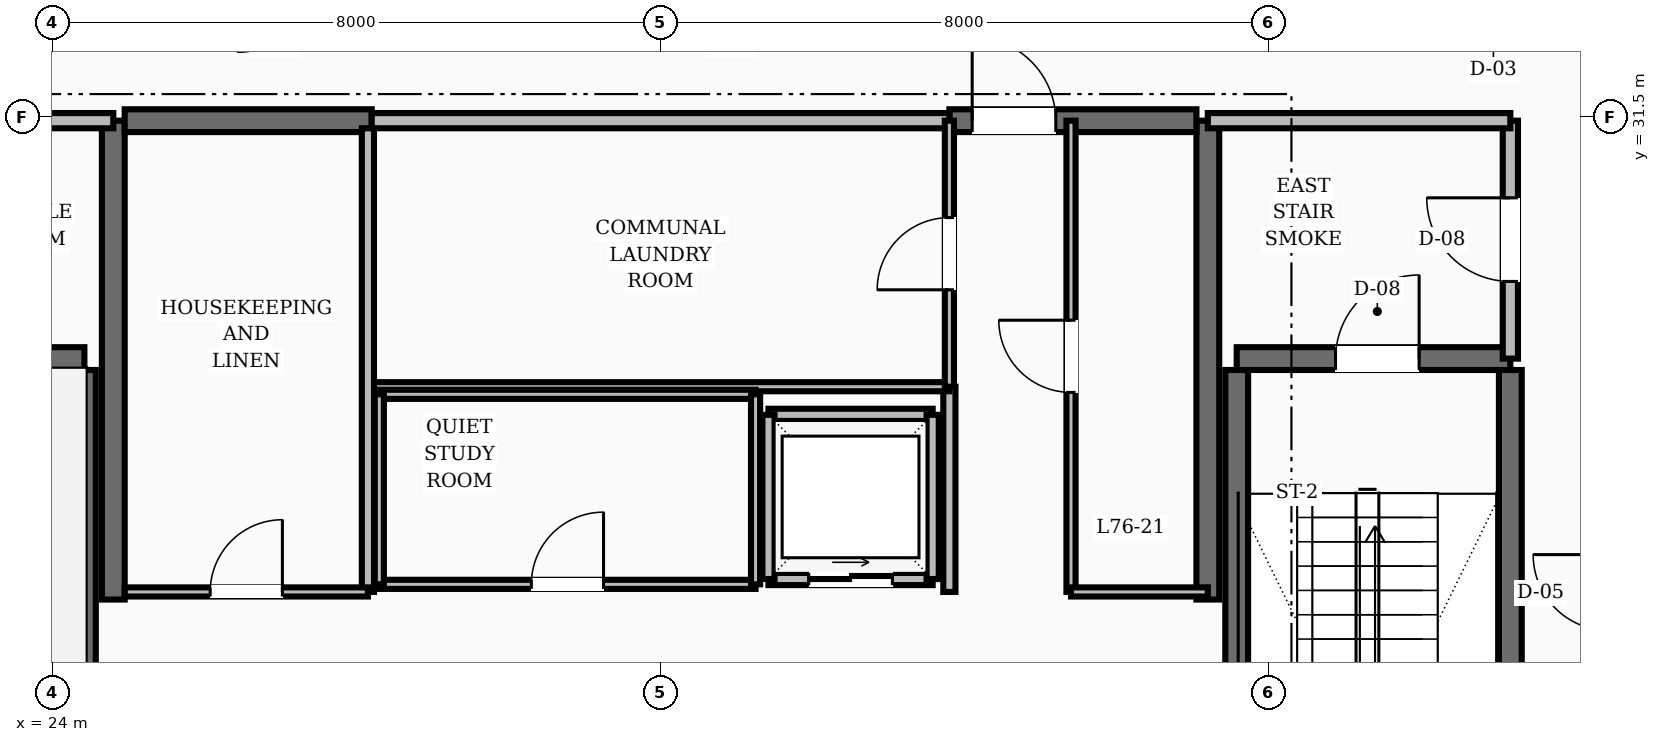
"""IFC4 building model, lengths in metres.
Left out: names, types, materials, properties, quantities, classifications, styles, units other than length and angle.
Written with IfcOpenShell. Run it as: python <this file> out.ifc"""

import sys

from ifc_helpers import new_model, si_unit, direction, frame, frame_2d, origin, place, context, subcontext, project, spatial, rectangle, extrude, element, fill, save


model = new_model("IFC4")
c1 = context("Model", 3, precision=1e-05, world=origin(), true_north=direction((0.0, 1.0)))
c2 = subcontext(c1, "Body", "Model", "MODEL_VIEW")
j1 = project(units=[si_unit("LENGTHUNIT", "METRE"), si_unit("PLANEANGLEUNIT", "RADIAN")], contexts=[c1])
p1 = place(None, origin())
s1 = spatial("IfcSite", under=j1, at=p1, CompositionType="ELEMENT")
p2 = place(p1, origin())
s2 = spatial("IfcBuilding", under=s1, at=p2, CompositionType="ELEMENT")
p3 = place(p2, frame((0.0, 0.0, 290.4)))
s3 = spatial("IfcBuildingStorey", under=s2, at=p3, CompositionType="ELEMENT", Elevation=290.4)
for number, where, z_axis, x_axis in (
    (1, (24.8, 25.15, 0.0), (0.0, 0.0, 1.0), (0.0, 1.0, 0.0)),
    (2, (39.2, 25.15, 0.0), (0.0, 0.0, 1.0), (0.0, 1.0, 0.0)),
):
    element("IfcWall", number, at=place(p3, frame(where, z_axis=z_axis, x_axis=x_axis)), inside=s3, PredefinedType="SHEAR", context=c2, shape_type="SweptSolid", body=[
        extrude(rectangle(XDim=6.3, YDim=0.3, at=frame_2d((3.15, 0.0))), origin(), (0.0, 0.0, 1.0), 3.6),
    ])
p4 = place(p3, frame((24.95, 31.45, 0.0), z_axis=(0.0, 0.0, 1.0), x_axis=(1.0, 0.0, 0.0)))
e3 = element("IfcWall", 3, at=p4, inside=s3, PredefinedType="SHEAR", context=c2, shape_type="SweptSolid", body=[
    extrude(rectangle(XDim=3.25, YDim=0.3, at=frame_2d((1.625, 0.0))), origin(), (0.0, 0.0, 1.0), 3.6),
])
p5 = place(p3, frame((35.8, 31.45, 0.0), z_axis=(0.0, 0.0, 1.0), x_axis=(1.0, 0.0, 0.0)))
e4 = element("IfcWall", 4, at=p5, inside=s3, PredefinedType="SHEAR", context=c2, shape_type="SweptSolid", body=[
    extrude(rectangle(XDim=3.25, YDim=0.3, at=frame_2d((1.625, 0.0))), origin(), (0.0, 0.0, 1.0), 3.6),
])
p6 = place(p5, frame((0.3, 0.0, 0.0)))
e5 = element("IfcOpeningElement", 5, at=p6, cuts=e4, PredefinedType="OPENING", context=c2, shape_type="SweptSolid", body=[
    extrude(rectangle(XDim=1.1, YDim=2.1, at=frame_2d((0.55, 1.05))), frame((0.0, 0.16, 0.0), z_axis=(0.0, -1.0, 0.0), x_axis=(1.0, 0.0, 0.0)), (0.0, 0.0, 1.0), 0.32),
])
p7 = place(p3, frame((24.42, 19.43, 0.0), z_axis=(0.0, 0.0, 1.0), x_axis=(0.0, 1.0, 0.0)))
e6 = element("IfcWall", 6, at=p7, inside=s3, PredefinedType="SHEAR", context=c2, shape_type="SweptSolid", body=[
    extrude(rectangle(XDim=8.74, YDim=0.3, at=frame_2d((4.37, 0.0))), origin(), (0.0, 0.0, 1.0), 3.6),
])
p8 = place(p3, frame((20.82, 28.32, 0.0), z_axis=(0.0, 0.0, 1.0), x_axis=(1.0, 0.0, 0.0)))
e7 = element("IfcWall", 7, at=p8, inside=s3, PredefinedType="SHEAR", context=c2, shape_type="SweptSolid", body=[
    extrude(rectangle(XDim=3.6, YDim=0.3, at=frame_2d((1.8, 0.0))), origin(), (0.0, 0.0, 1.0), 3.6),
])
for number, where, z_axis, x_axis in (
    (8, (43.18, 19.43, 0.0), (0.0, 0.0, 1.0), (0.0, 1.0, 0.0)),
    (9, (39.58, 19.43, 0.0), (0.0, 0.0, 1.0), (0.0, 1.0, 0.0)),
):
    element("IfcWall", number, at=place(p3, frame(where, z_axis=z_axis, x_axis=x_axis)), inside=s3, PredefinedType="SHEAR", context=c2, shape_type="SweptSolid", body=[
        extrude(rectangle(XDim=8.74, YDim=0.3, at=frame_2d((4.37, 0.0))), origin(), (0.0, 0.0, 1.0), 3.6),
    ])
p9 = place(p3, frame((39.58, 28.32, 0.0), z_axis=(0.0, 0.0, 1.0), x_axis=(1.0, 0.0, 0.0)))
e10 = element("IfcWall", 10, at=p9, inside=s3, PredefinedType="SHEAR", context=c2, shape_type="SweptSolid", body=[
    extrude(rectangle(XDim=3.6, YDim=0.3, at=frame_2d((1.8, 0.0))), origin(), (0.0, 0.0, 1.0), 3.6),
])
p10 = place(p9, frame((1.3, 0.0, 0.0)))
e11 = element("IfcOpeningElement", 11, at=p10, cuts=e10, PredefinedType="OPENING", context=c2, shape_type="SweptSolid", body=[
    extrude(rectangle(XDim=1.1, YDim=2.1, at=frame_2d((0.55, 1.05))), frame((0.0, 0.16, 0.0), z_axis=(0.0, -1.0, 0.0), x_axis=(1.0, 0.0, 0.0)), (0.0, 0.0, 1.0), 0.32),
])
p11 = place(p3, frame((43.18, 28.32, 0.0), z_axis=(0.0, 0.0, 1.0), x_axis=(0.0, 1.0, 0.0)))
e12 = element("IfcWall", 12, at=p11, inside=s3, PredefinedType="SOLIDWALL", context=c2, shape_type="SweptSolid", body=[
    extrude(rectangle(XDim=3.13, YDim=0.2, at=frame_2d((1.565, 0.0))), origin(), (0.0, 0.0, 1.0), 2.87),
])
p12 = place(p11, frame((1.015, 0.0, 0.0)))
e13 = element("IfcOpeningElement", 13, at=p12, cuts=e12, PredefinedType="OPENING", context=c2, shape_type="SweptSolid", body=[
    extrude(rectangle(XDim=1.1, YDim=2.1, at=frame_2d((0.55, 1.05))), frame((0.0, 0.11, 0.0), z_axis=(0.0, -1.0, 0.0), x_axis=(1.0, 0.0, 0.0)), (0.0, 0.0, 1.0), 0.22),
])
for number, where, z_axis, x_axis in (
    (14, (39.2, 31.45, 0.0), (0.0, 0.0, 1.0), (1.0, 0.0, 0.0)),
    (15, (20.82, 31.45, 0.0), (0.0, 0.0, 1.0), (1.0, 0.0, 0.0)),
):
    element("IfcWall", number, at=place(p3, frame(where, z_axis=z_axis, x_axis=x_axis)), inside=s3, PredefinedType="SOLIDWALL", context=c2, shape_type="SweptSolid", body=[
        extrude(rectangle(XDim=3.98, YDim=0.2, at=frame_2d((1.99, 0.0))), origin(), (0.0, 0.0, 1.0), 2.87),
    ])
p13 = place(p3, frame((35.8, 25.25, 0.0), z_axis=(0.0, 0.0, 1.0), x_axis=(0.0, 1.0, 0.0)))
e16 = element("IfcWall", 16, at=p13, inside=s3, PredefinedType="SOLIDWALL", context=c2, shape_type="SweptSolid", body=[
    extrude(rectangle(XDim=2.7, YDim=0.16, at=frame_2d((1.35, 0.0))), origin(), (0.0, 0.0, 1.0), 2.87),
])
p14 = place(p3, frame((33.42, 25.42, 0.0), z_axis=(0.0, 0.0, 1.0), x_axis=(1.0, 0.0, 0.0)))
e17 = element("IfcWall", 17, at=p14, inside=s3, PredefinedType="SOLIDWALL", context=c2, shape_type="SweptSolid", body=[
    extrude(rectangle(XDim=2.16, YDim=0.16, at=frame_2d((1.08, 0.0))), origin(), (0.0, 0.0, 1.0), 2.87),
])
p15 = place(p14, frame((0.53, 0.0, 0.0)))
e18 = element("IfcOpeningElement", 18, at=p15, cuts=e17, PredefinedType="OPENING", context=c2, shape_type="SweptSolid", body=[
    extrude(rectangle(XDim=1.1, YDim=2.15, at=frame_2d((0.55, 1.075))), frame((0.0, 0.09, 0.0), z_axis=(0.0, -1.0, 0.0), x_axis=(1.0, 0.0, 0.0)), (0.0, 0.0, 1.0), 0.18),
])
for number, where, z_axis, x_axis in (
    (19, (33.42, 27.58, 0.0), (0.0, 0.0, 1.0), (1.0, 0.0, 0.0)),
    (20, (33.42, 25.42, 0.0), (0.0, 0.0, 1.0), (0.0, 1.0, 0.0)),
    (21, (35.58, 25.42, 0.0), (0.0, 0.0, 1.0), (0.0, 1.0, 0.0)),
):
    element("IfcWall", number, at=place(p3, frame(where, z_axis=z_axis, x_axis=x_axis)), inside=s3, PredefinedType="SOLIDWALL", context=c2, shape_type="SweptSolid", body=[
        extrude(rectangle(XDim=2.16, YDim=0.16, at=frame_2d((1.08, 0.0))), origin(), (0.0, 0.0, 1.0), 2.87),
    ])
p16 = place(p3, frame((28.2, 31.45, 0.0), z_axis=(0.0, 0.0, 1.0), x_axis=(1.0, 0.0, 0.0)))
e22 = element("IfcWall", 22, at=p16, inside=s3, PredefinedType="SOLIDWALL", context=c2, shape_type="SweptSolid", body=[
    extrude(rectangle(XDim=7.6, YDim=0.2, at=frame_2d((3.8, 0.0))), origin(), (0.0, 0.0, 1.0), 2.87),
])
p17 = place(p3, frame((28.2, 27.95, 0.0), z_axis=(0.0, 0.0, 1.0), x_axis=(1.0, 0.0, 0.0)))
e23 = element("IfcWall", 23, at=p17, inside=s3, PredefinedType="PARTITIONING", context=c2, shape_type="SweptSolid", body=[
    extrude(rectangle(XDim=7.6, YDim=0.12, at=frame_2d((3.8, 0.0))), origin(), (0.0, 0.0, 1.0), 2.87),
])
p18 = place(p3, frame((35.8, 27.95, 0.0), z_axis=(0.0, 0.0, 1.0), x_axis=(0.0, 1.0, 0.0)))
e24 = element("IfcWall", 24, at=p18, inside=s3, PredefinedType="PARTITIONING", context=c2, shape_type="SweptSolid", body=[
    extrude(rectangle(XDim=3.5, YDim=0.12, at=frame_2d((1.75, 0.0))), origin(), (0.0, 0.0, 1.0), 2.87),
])
p19 = place(p18, frame((1.275, 0.0, 0.0)))
e25 = element("IfcOpeningElement", 25, at=p19, cuts=e24, PredefinedType="OPENING", context=c2, shape_type="SweptSolid", body=[
    extrude(rectangle(XDim=0.95, YDim=2.1, at=frame_2d((0.475, 1.05))), frame((0.0, 0.07, 0.0), z_axis=(0.0, -1.0, 0.0), x_axis=(1.0, 0.0, 0.0)), (0.0, 0.0, 1.0), 0.14),
])
p20 = place(p3, frame((28.3, 25.35, 0.0), z_axis=(0.0, 0.0, 1.0), x_axis=(1.0, 0.0, 0.0)))
e26 = element("IfcWall", 26, at=p20, inside=s3, PredefinedType="PARTITIONING", context=c2, shape_type="SweptSolid", body=[
    extrude(rectangle(XDim=4.95, YDim=0.12, at=frame_2d((2.475, 0.0))), origin(), (0.0, 0.0, 1.0), 2.87),
])
p21 = place(p20, frame((2.0, 0.0, 0.0)))
e27 = element("IfcOpeningElement", 27, at=p21, cuts=e26, PredefinedType="OPENING", context=c2, shape_type="SweptSolid", body=[
    extrude(rectangle(XDim=0.95, YDim=2.1, at=frame_2d((0.475, 1.05))), frame((0.0, 0.07, 0.0), z_axis=(0.0, -1.0, 0.0), x_axis=(1.0, 0.0, 0.0)), (0.0, 0.0, 1.0), 0.14),
])
p22 = place(p3, frame((28.3, 27.85, 0.0), z_axis=(0.0, 0.0, 1.0), x_axis=(1.0, 0.0, 0.0)))
e28 = element("IfcWall", 28, at=p22, inside=s3, PredefinedType="PARTITIONING", context=c2, shape_type="SweptSolid", body=[
    extrude(rectangle(XDim=4.95, YDim=0.12, at=frame_2d((2.475, 0.0))), origin(), (0.0, 0.0, 1.0), 2.87),
])
for number, where, z_axis, x_axis in (
    (29, (28.3, 25.35, 0.0), (0.0, 0.0, 1.0), (0.0, 1.0, 0.0)),
    (30, (33.25, 25.35, 0.0), (0.0, 0.0, 1.0), (0.0, 1.0, 0.0)),
):
    element("IfcWall", number, at=place(p3, frame(where, z_axis=z_axis, x_axis=x_axis)), inside=s3, PredefinedType="PARTITIONING", context=c2, shape_type="SweptSolid", body=[
        extrude(rectangle(XDim=2.5, YDim=0.12, at=frame_2d((1.25, 0.0))), origin(), (0.0, 0.0, 1.0), 2.87),
    ])
p23 = place(p3, frame((28.15, 25.25, 0.0), z_axis=(0.0, 0.0, 1.0), x_axis=(0.0, 1.0, 0.0)))
e31 = element("IfcWall", 31, at=p23, inside=s3, PredefinedType="SOLIDWALL", context=c2, shape_type="SweptSolid", body=[
    extrude(rectangle(XDim=6.1, YDim=0.16, at=frame_2d((3.05, 0.0))), origin(), (0.0, 0.0, 1.0), 2.87),
])
p24 = place(p3, frame((24.95, 25.25, 0.0), z_axis=(0.0, 0.0, 1.0), x_axis=(1.0, 0.0, 0.0)))
e32 = element("IfcWall", 32, at=p24, inside=s3, PredefinedType="PARTITIONING", context=c2, shape_type="SweptSolid", body=[
    extrude(rectangle(XDim=3.2, YDim=0.12, at=frame_2d((1.6, 0.0))), origin(), (0.0, 0.0, 1.0), 2.87),
])
p25 = place(p24, frame((1.125, 0.0, 0.0)))
e33 = element("IfcOpeningElement", 33, at=p25, cuts=e32, PredefinedType="OPENING", context=c2, shape_type="SweptSolid", body=[
    extrude(rectangle(XDim=0.95, YDim=2.1, at=frame_2d((0.475, 1.05))), frame((0.0, 0.07, 0.0), z_axis=(0.0, -1.0, 0.0), x_axis=(1.0, 0.0, 0.0)), (0.0, 0.0, 1.0), 0.14),
])
p26 = place(p3, frame((37.4, 25.25, 0.0), z_axis=(0.0, 0.0, 1.0), x_axis=(0.0, 1.0, 0.0)))
e34 = element("IfcWall", 34, at=p26, inside=s3, PredefinedType="PARTITIONING", context=c2, shape_type="SweptSolid", body=[
    extrude(rectangle(XDim=6.2, YDim=0.12, at=frame_2d((3.1, 0.0))), origin(), (0.0, 0.0, 1.0), 2.87),
])
p27 = place(p26, frame((2.625, 0.0, 0.0)))
e35 = element("IfcOpeningElement", 35, at=p27, cuts=e34, PredefinedType="OPENING", context=c2, shape_type="SweptSolid", body=[
    extrude(rectangle(XDim=0.95, YDim=2.1, at=frame_2d((0.475, 1.05))), frame((0.0, 0.07, 0.0), z_axis=(0.0, -1.0, 0.0), x_axis=(1.0, 0.0, 0.0)), (0.0, 0.0, 1.0), 0.14),
])
p28 = place(p3, frame((37.4, 25.25, 0.0), z_axis=(0.0, 0.0, 1.0), x_axis=(1.0, 0.0, 0.0)))
e36 = element("IfcWall", 36, at=p28, inside=s3, PredefinedType="PARTITIONING", context=c2, shape_type="SweptSolid", body=[
    extrude(rectangle(XDim=1.8, YDim=0.12, at=frame_2d((0.9, 0.0))), origin(), (0.0, 0.0, 1.0), 2.87),
])
p29 = place(p3, frame((44.427, 32.303, 0.0), z_axis=(0.0, 0.0, 1.0), x_axis=(-0.707106781187, 0.707106781187, 0.0)))
e37 = element("IfcWall", 37, at=p29, inside=s3, PredefinedType="SOLIDWALL", context=c2, shape_type="SweptSolid", body=[
    extrude(rectangle(XDim=2.916, YDim=0.16, at=frame_2d((1.458, 0.0))), origin(), (0.0, 0.0, 1.0), 2.87),
])
p30 = place(p29, frame((0.983, 0.0, 0.0)))
e38 = element("IfcOpeningElement", 38, at=p30, cuts=e37, PredefinedType="OPENING", context=c2, shape_type="SweptSolid", body=[
    extrude(rectangle(XDim=0.95, YDim=2.1, at=frame_2d((0.475, 1.05))), frame((0.0, 0.09, 0.0), z_axis=(0.0, -1.0, 0.0), x_axis=(1.0, 0.0, 0.0)), (0.0, 0.0, 1.0), 0.18),
])
p31 = place(p10, origin())
e39 = element("IfcDoor", 39, at=p31, inside=s3, OperationType="SINGLE_SWING_RIGHT", PredefinedType="DOOR", context=c2, shape_type="SweptSolid", body=[
    extrude(rectangle(XDim=1.1, YDim=2.1, at=frame_2d((0.55, 1.05))), frame((0.0, 0.025, 0.0), z_axis=(0.0, -1.0, 0.0), x_axis=(1.0, 0.0, 0.0)), (0.0, 0.0, 1.0), 0.05),
])
fill(e11, e39)
p32 = place(p12, origin())
e40 = element("IfcDoor", 40, at=p32, inside=s3, OperationType="SINGLE_SWING_RIGHT", PredefinedType="DOOR", context=c2, shape_type="SweptSolid", body=[
    extrude(rectangle(XDim=1.1, YDim=2.1, at=frame_2d((0.55, 1.05))), frame((0.0, 0.025, 0.0), z_axis=(0.0, -1.0, 0.0), x_axis=(1.0, 0.0, 0.0)), (0.0, 0.0, 1.0), 0.05),
])
fill(e13, e40)
p33 = place(p6, origin())
e41 = element("IfcDoor", 41, at=p33, inside=s3, OperationType="SINGLE_SWING_LEFT", PredefinedType="DOOR", context=c2, shape_type="SweptSolid", body=[
    extrude(rectangle(XDim=1.1, YDim=2.1, at=frame_2d((0.55, 1.05))), frame((0.0, 0.025, 0.0), z_axis=(0.0, -1.0, 0.0), x_axis=(1.0, 0.0, 0.0)), (0.0, 0.0, 1.0), 0.05),
])
fill(e5, e41)
p34 = place(p15, origin())
e42 = element("IfcDoor", 42, at=p34, inside=s3, OperationType="SLIDING_TO_RIGHT", PredefinedType="DOOR", context=c2, shape_type="SweptSolid", body=[
    extrude(rectangle(XDim=1.1, YDim=2.15, at=frame_2d((0.55, 1.075))), frame((0.0, 0.025, 0.0), z_axis=(0.0, -1.0, 0.0), x_axis=(1.0, 0.0, 0.0)), (0.0, 0.0, 1.0), 0.05),
])
fill(e18, e42)
p35 = place(p19, origin())
e43 = element("IfcDoor", 43, at=p35, inside=s3, OperationType="SINGLE_SWING_LEFT", PredefinedType="DOOR", context=c2, shape_type="SweptSolid", body=[
    extrude(rectangle(XDim=0.95, YDim=2.1, at=frame_2d((0.475, 1.05))), frame((0.0, 0.025, 0.0), z_axis=(0.0, -1.0, 0.0), x_axis=(1.0, 0.0, 0.0)), (0.0, 0.0, 1.0), 0.05),
])
fill(e25, e43)
p36 = place(p21, origin())
e44 = element("IfcDoor", 44, at=p36, inside=s3, OperationType="SINGLE_SWING_RIGHT", PredefinedType="DOOR", context=c2, shape_type="SweptSolid", body=[
    extrude(rectangle(XDim=0.95, YDim=2.1, at=frame_2d((0.475, 1.05))), frame((0.0, 0.025, 0.0), z_axis=(0.0, -1.0, 0.0), x_axis=(1.0, 0.0, 0.0)), (0.0, 0.0, 1.0), 0.05),
])
fill(e27, e44)
p37 = place(p25, origin())
e45 = element("IfcDoor", 45, at=p37, inside=s3, OperationType="SINGLE_SWING_RIGHT", PredefinedType="DOOR", context=c2, shape_type="SweptSolid", body=[
    extrude(rectangle(XDim=0.95, YDim=2.1, at=frame_2d((0.475, 1.05))), frame((0.0, 0.025, 0.0), z_axis=(0.0, -1.0, 0.0), x_axis=(1.0, 0.0, 0.0)), (0.0, 0.0, 1.0), 0.05),
])
fill(e33, e45)
p38 = place(p27, origin())
e46 = element("IfcDoor", 46, at=p38, inside=s3, OperationType="SINGLE_SWING_RIGHT", PredefinedType="DOOR", context=c2, shape_type="SweptSolid", body=[
    extrude(rectangle(XDim=0.95, YDim=2.1, at=frame_2d((0.475, 1.05))), frame((0.0, 0.025, 0.0), z_axis=(0.0, -1.0, 0.0), x_axis=(1.0, 0.0, 0.0)), (0.0, 0.0, 1.0), 0.05),
])
fill(e35, e46)
save(model, sys.argv[1])
